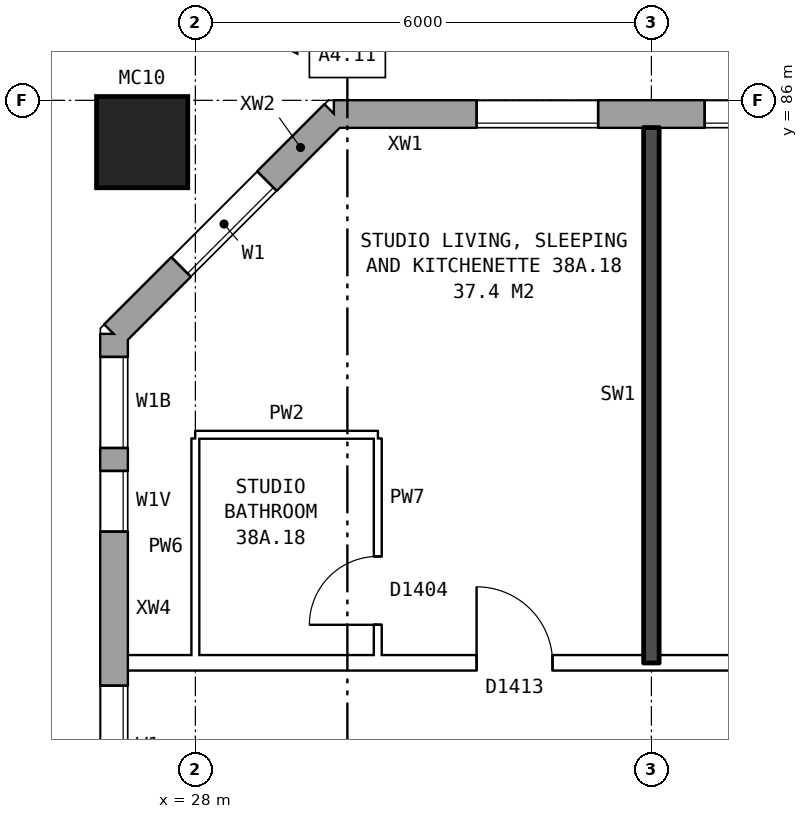
"""IFC4 building model, lengths in metres.
Left out: names, types, materials, properties, quantities, classifications, styles, units other than length and angle.
Written with IfcOpenShell. Run it as: python <this file> out.ifc"""

import sys

from ifc_helpers import new_model, si_unit, direction, frame, frame_2d, origin, origin_2d, place, context, subcontext, project, spatial, rectangle, hollow_rectangle, extrude, element, fill, save


model = new_model("IFC4")
c1 = context("Model", 3, precision=1e-05, world=origin(), true_north=direction((0.0, 1.0)))
c2 = subcontext(c1, "Body", "Model", "MODEL_VIEW")
j1 = project(units=[si_unit("LENGTHUNIT", "METRE"), si_unit("PLANEANGLEUNIT", "RADIAN")], contexts=[c1])
p1 = place(None, origin())
s1 = spatial("IfcSite", under=j1, at=p1, CompositionType="ELEMENT")
p2 = place(p1, origin())
s2 = spatial("IfcBuilding", under=s1, at=p2, CompositionType="ELEMENT")
p3 = place(p2, frame((0.0, 0.0, 136.1)))
s3 = spatial("IfcBuildingStorey", under=s2, at=p3, CompositionType="ELEMENT", Elevation=136.1)
p4 = place(p3, frame((27.3, 85.45, 0.0), z_axis=(0.0, 0.0, 1.0), x_axis=(1.0, 0.0, 0.0)))
e1 = element("IfcColumn", 1, at=p4, inside=s3, PredefinedType="COLUMN", context=c2, shape_type="SweptSolid", body=[
    extrude(hollow_rectangle(XDim=1.2, YDim=1.2, WallThickness=0.065, at=origin_2d()), origin(), (0.0, 0.0, 1.0), 3.1),
])
p5 = place(p3, frame((72.925, 85.82, 0.0), z_axis=(0.0, 0.0, 1.0), x_axis=(-1.0, 0.0, 0.0)))
e2 = element("IfcWall", 2, at=p5, inside=s3, PredefinedType="STANDARD", context=c2, shape_type="SweptSolid", body=[
    extrude(rectangle(XDim=43.101, YDim=0.36, at=frame_2d((21.55, 0.0))), origin(), (0.0, 0.0, 1.0), 2.85),
])
p6 = place(p5, frame((0.625, 0.0, 0.8)))
e3 = element("IfcOpeningElement", 3, at=p6, cuts=e2, PredefinedType="OPENING", context=c2, shape_type="SweptSolid", body=[
    extrude(rectangle(XDim=1.6, YDim=1.8, at=frame_2d((0.8, 0.9))), frame((0.0, 0.19, 0.0), z_axis=(0.0, -1.0, 0.0), x_axis=(1.0, 0.0, 0.0)), (0.0, 0.0, 1.0), 0.38),
])
p7 = place(p5, frame((3.625, 0.0, 0.8)))
e4 = element("IfcOpeningElement", 4, at=p7, cuts=e2, PredefinedType="OPENING", context=c2, shape_type="SweptSolid", body=[
    extrude(rectangle(XDim=1.6, YDim=1.8, at=frame_2d((0.8, 0.9))), frame((0.0, 0.19, 0.0), z_axis=(0.0, -1.0, 0.0), x_axis=(1.0, 0.0, 0.0)), (0.0, 0.0, 1.0), 0.38),
])
p8 = place(p5, frame((6.625, 0.0, 0.8)))
e5 = element("IfcOpeningElement", 5, at=p8, cuts=e2, PredefinedType="OPENING", context=c2, shape_type="SweptSolid", body=[
    extrude(rectangle(XDim=1.6, YDim=1.8, at=frame_2d((0.8, 0.9))), frame((0.0, 0.19, 0.0), z_axis=(0.0, -1.0, 0.0), x_axis=(1.0, 0.0, 0.0)), (0.0, 0.0, 1.0), 0.38),
])
p9 = place(p5, frame((9.625, 0.0, 0.8)))
e6 = element("IfcOpeningElement", 6, at=p9, cuts=e2, PredefinedType="OPENING", context=c2, shape_type="SweptSolid", body=[
    extrude(rectangle(XDim=1.6, YDim=1.8, at=frame_2d((0.8, 0.9))), frame((0.0, 0.19, 0.0), z_axis=(0.0, -1.0, 0.0), x_axis=(1.0, 0.0, 0.0)), (0.0, 0.0, 1.0), 0.38),
])
p10 = place(p5, frame((12.625, 0.0, 0.8)))
e7 = element("IfcOpeningElement", 7, at=p10, cuts=e2, PredefinedType="OPENING", context=c2, shape_type="SweptSolid", body=[
    extrude(rectangle(XDim=1.6, YDim=1.8, at=frame_2d((0.8, 0.9))), frame((0.0, 0.19, 0.0), z_axis=(0.0, -1.0, 0.0), x_axis=(1.0, 0.0, 0.0)), (0.0, 0.0, 1.0), 0.38),
])
p11 = place(p5, frame((15.125, 0.0, 1.35)))
e8 = element("IfcOpeningElement", 8, at=p11, cuts=e2, PredefinedType="OPENING", context=c2, shape_type="SweptSolid", body=[
    extrude(rectangle(XDim=1.0, YDim=1.2, at=frame_2d((0.5, 0.6))), frame((0.0, 0.19, 0.0), z_axis=(0.0, -1.0, 0.0), x_axis=(1.0, 0.0, 0.0)), (0.0, 0.0, 1.0), 0.38),
])
p12 = place(p5, frame((18.625, 0.0, 0.8)))
e9 = element("IfcOpeningElement", 9, at=p12, cuts=e2, PredefinedType="OPENING", context=c2, shape_type="SweptSolid", body=[
    extrude(rectangle(XDim=1.6, YDim=1.8, at=frame_2d((0.8, 0.9))), frame((0.0, 0.19, 0.0), z_axis=(0.0, -1.0, 0.0), x_axis=(1.0, 0.0, 0.0)), (0.0, 0.0, 1.0), 0.38),
])
p13 = place(p5, frame((21.625, 0.0, 0.8)))
e10 = element("IfcOpeningElement", 10, at=p13, cuts=e2, PredefinedType="OPENING", context=c2, shape_type="SweptSolid", body=[
    extrude(rectangle(XDim=1.6, YDim=1.8, at=frame_2d((0.8, 0.9))), frame((0.0, 0.19, 0.0), z_axis=(0.0, -1.0, 0.0), x_axis=(1.0, 0.0, 0.0)), (0.0, 0.0, 1.0), 0.38),
])
p14 = place(p5, frame((24.075, 0.0, 0.35)))
e11 = element("IfcOpeningElement", 11, at=p14, cuts=e2, PredefinedType="OPENING", context=c2, shape_type="SweptSolid", body=[
    extrude(rectangle(XDim=0.8, YDim=1.8, at=frame_2d((0.4, 0.9))), frame((0.0, 0.19, 0.0), z_axis=(0.0, -1.0, 0.0), x_axis=(1.0, 0.0, 0.0)), (0.0, 0.0, 1.0), 0.38),
])
p15 = place(p5, frame((27.625, 0.0, 0.8)))
e12 = element("IfcOpeningElement", 12, at=p15, cuts=e2, PredefinedType="OPENING", context=c2, shape_type="SweptSolid", body=[
    extrude(rectangle(XDim=1.6, YDim=1.8, at=frame_2d((0.8, 0.9))), frame((0.0, 0.19, 0.0), z_axis=(0.0, -1.0, 0.0), x_axis=(1.0, 0.0, 0.0)), (0.0, 0.0, 1.0), 0.38),
])
p16 = place(p5, frame((30.625, 0.0, 0.8)))
e13 = element("IfcOpeningElement", 13, at=p16, cuts=e2, PredefinedType="OPENING", context=c2, shape_type="SweptSolid", body=[
    extrude(rectangle(XDim=1.6, YDim=1.8, at=frame_2d((0.8, 0.9))), frame((0.0, 0.19, 0.0), z_axis=(0.0, -1.0, 0.0), x_axis=(1.0, 0.0, 0.0)), (0.0, 0.0, 1.0), 0.38),
])
p17 = place(p5, frame((33.625, 0.0, 0.8)))
e14 = element("IfcOpeningElement", 14, at=p17, cuts=e2, PredefinedType="OPENING", context=c2, shape_type="SweptSolid", body=[
    extrude(rectangle(XDim=1.6, YDim=1.8, at=frame_2d((0.8, 0.9))), frame((0.0, 0.19, 0.0), z_axis=(0.0, -1.0, 0.0), x_axis=(1.0, 0.0, 0.0)), (0.0, 0.0, 1.0), 0.38),
])
p18 = place(p5, frame((36.625, 0.0, 0.8)))
e15 = element("IfcOpeningElement", 15, at=p18, cuts=e2, PredefinedType="OPENING", context=c2, shape_type="SweptSolid", body=[
    extrude(rectangle(XDim=1.6, YDim=1.8, at=frame_2d((0.8, 0.9))), frame((0.0, 0.19, 0.0), z_axis=(0.0, -1.0, 0.0), x_axis=(1.0, 0.0, 0.0)), (0.0, 0.0, 1.0), 0.38),
])
p19 = place(p5, frame((39.625, 0.0, 0.8)))
e16 = element("IfcOpeningElement", 16, at=p19, cuts=e2, PredefinedType="OPENING", context=c2, shape_type="SweptSolid", body=[
    extrude(rectangle(XDim=1.6, YDim=1.8, at=frame_2d((0.8, 0.9))), frame((0.0, 0.19, 0.0), z_axis=(0.0, -1.0, 0.0), x_axis=(1.0, 0.0, 0.0)), (0.0, 0.0, 1.0), 0.38),
])
p20 = place(p5, frame((16.975, 0.0, 0.15)))
e17 = element("IfcOpeningElement", 17, at=p20, cuts=e2, PredefinedType="OPENING", context=c2, shape_type="SweptSolid", body=[
    extrude(rectangle(XDim=0.8, YDim=0.9, at=frame_2d((0.4, 0.45))), frame((0.0, 0.19, 0.0), z_axis=(0.0, -1.0, 0.0), x_axis=(1.0, 0.0, 0.0)), (0.0, 0.0, 1.0), 0.38),
])
p21 = place(p5, frame((25.175, 0.0, 0.25)))
e18 = element("IfcOpeningElement", 18, at=p21, cuts=e2, PredefinedType="OPENING", context=c2, shape_type="SweptSolid", body=[
    extrude(rectangle(XDim=0.8, YDim=0.9, at=frame_2d((0.4, 0.45))), frame((0.0, 0.19, 0.0), z_axis=(0.0, -1.0, 0.0), x_axis=(1.0, 0.0, 0.0)), (0.0, 0.0, 1.0), 0.38),
])
p22 = place(p3, frame((29.825, 85.82, 0.0), z_axis=(0.0, 0.0, 1.0), x_axis=(-0.707106781187, -0.707106781187, 0.0)))
e19 = element("IfcWall", 19, at=p22, inside=s3, PredefinedType="STANDARD", context=c2, shape_type="SweptSolid", body=[
    extrude(rectangle(XDim=4.094, YDim=0.36, at=frame_2d((2.047, 0.0))), origin(), (0.0, 0.0, 1.0), 2.85),
])
p23 = place(p22, frame((1.247, 0.0, 0.8)))
e20 = element("IfcOpeningElement", 20, at=p23, cuts=e19, PredefinedType="OPENING", context=c2, shape_type="SweptSolid", body=[
    extrude(rectangle(XDim=1.6, YDim=1.8, at=frame_2d((0.8, 0.9))), frame((0.0, 0.19, 0.0), z_axis=(0.0, -1.0, 0.0), x_axis=(1.0, 0.0, 0.0)), (0.0, 0.0, 1.0), 0.38),
])
p24 = place(p3, frame((26.93, 82.925, 0.0), z_axis=(0.0, 0.0, 1.0), x_axis=(0.0, -1.0, 0.0)))
e21 = element("IfcWall", 21, at=p24, inside=s3, PredefinedType="STANDARD", context=c2, shape_type="SweptSolid", body=[
    extrude(rectangle(XDim=25.851, YDim=0.36, at=frame_2d((12.925, 0.0))), origin(), (0.0, 0.0, 1.0), 2.85),
])
p25 = place(p24, frame((0.3, 0.0, 0.8)))
e22 = element("IfcOpeningElement", 22, at=p25, cuts=e21, PredefinedType="OPENING", context=c2, shape_type="SweptSolid", body=[
    extrude(rectangle(XDim=1.2, YDim=1.8, at=frame_2d((0.6, 0.9))), frame((0.0, 0.19, 0.0), z_axis=(0.0, -1.0, 0.0), x_axis=(1.0, 0.0, 0.0)), (0.0, 0.0, 1.0), 0.38),
])
p26 = place(p24, frame((4.625, 0.0, 0.8)))
e23 = element("IfcOpeningElement", 23, at=p26, cuts=e21, PredefinedType="OPENING", context=c2, shape_type="SweptSolid", body=[
    extrude(rectangle(XDim=1.6, YDim=1.8, at=frame_2d((0.8, 0.9))), frame((0.0, 0.19, 0.0), z_axis=(0.0, -1.0, 0.0), x_axis=(1.0, 0.0, 0.0)), (0.0, 0.0, 1.0), 0.38),
])
p27 = place(p24, frame((7.625, 0.0, 0.8)))
e24 = element("IfcOpeningElement", 24, at=p27, cuts=e21, PredefinedType="OPENING", context=c2, shape_type="SweptSolid", body=[
    extrude(rectangle(XDim=1.6, YDim=1.8, at=frame_2d((0.8, 0.9))), frame((0.0, 0.19, 0.0), z_axis=(0.0, -1.0, 0.0), x_axis=(1.0, 0.0, 0.0)), (0.0, 0.0, 1.0), 0.38),
])
p28 = place(p24, frame((10.625, 0.0, 0.8)))
e25 = element("IfcOpeningElement", 25, at=p28, cuts=e21, PredefinedType="OPENING", context=c2, shape_type="SweptSolid", body=[
    extrude(rectangle(XDim=1.6, YDim=1.8, at=frame_2d((0.8, 0.9))), frame((0.0, 0.19, 0.0), z_axis=(0.0, -1.0, 0.0), x_axis=(1.0, 0.0, 0.0)), (0.0, 0.0, 1.0), 0.38),
])
p29 = place(p24, frame((13.625, 0.0, 0.8)))
e26 = element("IfcOpeningElement", 26, at=p29, cuts=e21, PredefinedType="OPENING", context=c2, shape_type="SweptSolid", body=[
    extrude(rectangle(XDim=1.6, YDim=1.8, at=frame_2d((0.8, 0.9))), frame((0.0, 0.19, 0.0), z_axis=(0.0, -1.0, 0.0), x_axis=(1.0, 0.0, 0.0)), (0.0, 0.0, 1.0), 0.38),
])
p30 = place(p24, frame((16.625, 0.0, 0.8)))
e27 = element("IfcOpeningElement", 27, at=p30, cuts=e21, PredefinedType="OPENING", context=c2, shape_type="SweptSolid", body=[
    extrude(rectangle(XDim=1.6, YDim=1.8, at=frame_2d((0.8, 0.9))), frame((0.0, 0.19, 0.0), z_axis=(0.0, -1.0, 0.0), x_axis=(1.0, 0.0, 0.0)), (0.0, 0.0, 1.0), 0.38),
])
p31 = place(p24, frame((19.625, 0.0, 0.8)))
e28 = element("IfcOpeningElement", 28, at=p31, cuts=e21, PredefinedType="OPENING", context=c2, shape_type="SweptSolid", body=[
    extrude(rectangle(XDim=1.6, YDim=1.8, at=frame_2d((0.8, 0.9))), frame((0.0, 0.19, 0.0), z_axis=(0.0, -1.0, 0.0), x_axis=(1.0, 0.0, 0.0)), (0.0, 0.0, 1.0), 0.38),
])
p32 = place(p24, frame((23.125, 0.0, 0.8)))
e29 = element("IfcOpeningElement", 29, at=p32, cuts=e21, PredefinedType="OPENING", context=c2, shape_type="SweptSolid", body=[
    extrude(rectangle(XDim=1.0, YDim=0.9, at=frame_2d((0.5, 0.45))), frame((0.0, 0.19, 0.0), z_axis=(0.0, -1.0, 0.0), x_axis=(1.0, 0.0, 0.0)), (0.0, 0.0, 1.0), 0.38),
])
p33 = place(p24, frame((1.8, 0.0, 0.8)))
e30 = element("IfcOpeningElement", 30, at=p33, cuts=e21, PredefinedType="OPENING", context=c2, shape_type="SweptSolid", body=[
    extrude(rectangle(XDim=0.8, YDim=0.9, at=frame_2d((0.4, 0.45))), frame((0.0, 0.19, 0.0), z_axis=(0.0, -1.0, 0.0), x_axis=(1.0, 0.0, 0.0)), (0.0, 0.0, 1.0), 0.38),
])
p34 = place(p24, frame((24.425, 0.0, 0.8)))
e31 = element("IfcOpeningElement", 31, at=p34, cuts=e21, PredefinedType="OPENING", context=c2, shape_type="SweptSolid", body=[
    extrude(rectangle(XDim=1.0, YDim=1.8, at=frame_2d((0.5, 0.9))), frame((0.0, 0.19, 0.0), z_axis=(0.0, -1.0, 0.0), x_axis=(1.0, 0.0, 0.0)), (0.0, 0.0, 1.0), 0.38),
])
p35 = place(p3, frame((27.11, 78.6, 0.0), z_axis=(0.0, 0.0, 1.0), x_axis=(1.0, 0.0, 0.0)))
e32 = element("IfcWall", 32, at=p35, inside=s3, PredefinedType="PARTITIONING", context=c2, shape_type="SweptSolid", body=[
    extrude(rectangle(XDim=18.79, YDim=0.2, at=frame_2d((9.395, 0.0))), origin(), (0.0, 0.0, 1.0), 2.85),
])
p36 = place(p35, frame((14.19, 0.0, 0.0)))
e33 = element("IfcOpeningElement", 33, at=p36, cuts=e32, PredefinedType="OPENING", context=c2, shape_type="SweptSolid", body=[
    extrude(rectangle(XDim=1.0, YDim=2.1, at=frame_2d((0.5, 1.05))), frame((0.0, 0.11, 0.0), z_axis=(0.0, -1.0, 0.0), x_axis=(1.0, 0.0, 0.0)), (0.0, 0.0, 1.0), 0.22),
])
p37 = place(p35, frame((8.19, 0.0, 0.0)))
e34 = element("IfcOpeningElement", 34, at=p37, cuts=e32, PredefinedType="OPENING", context=c2, shape_type="SweptSolid", body=[
    extrude(rectangle(XDim=1.0, YDim=2.1, at=frame_2d((0.5, 1.05))), frame((0.0, 0.11, 0.0), z_axis=(0.0, -1.0, 0.0), x_axis=(1.0, 0.0, 0.0)), (0.0, 0.0, 1.0), 0.22),
])
p38 = place(p35, frame((4.59, 0.0, 0.0)))
e35 = element("IfcOpeningElement", 35, at=p38, cuts=e32, PredefinedType="OPENING", context=c2, shape_type="SweptSolid", body=[
    extrude(rectangle(XDim=1.0, YDim=2.1, at=frame_2d((0.5, 1.05))), frame((0.0, 0.11, 0.0), z_axis=(0.0, -1.0, 0.0), x_axis=(1.0, 0.0, 0.0)), (0.0, 0.0, 1.0), 0.22),
])
p39 = place(p3, frame((28.0, 81.6, 0.0), z_axis=(0.0, 0.0, 1.0), x_axis=(1.0, 0.0, 0.0)))
e36 = element("IfcWall", 36, at=p39, inside=s3, PredefinedType="PARTITIONING", context=c2, shape_type="SweptSolid", body=[
    extrude(rectangle(XDim=2.4, YDim=0.1, at=frame_2d((1.2, 0.0))), origin(), (0.0, 0.0, 1.0), 2.85),
])
p40 = place(p3, frame((28.0, 78.7, 0.0), z_axis=(0.0, 0.0, 1.0), x_axis=(0.0, 1.0, 0.0)))
e37 = element("IfcWall", 37, at=p40, inside=s3, PredefinedType="PARTITIONING", context=c2, shape_type="SweptSolid", body=[
    extrude(rectangle(XDim=2.85, YDim=0.1, at=frame_2d((1.425, 0.0))), origin(), (0.0, 0.0, 1.0), 2.85),
])
p41 = place(p3, frame((30.4, 78.7, 0.0), z_axis=(0.0, 0.0, 1.0), x_axis=(0.0, 1.0, 0.0)))
e38 = element("IfcWall", 38, at=p41, inside=s3, PredefinedType="PARTITIONING", context=c2, shape_type="SweptSolid", body=[
    extrude(rectangle(XDim=2.85, YDim=0.1, at=frame_2d((1.425, 0.0))), origin(), (0.0, 0.0, 1.0), 2.85),
])
p42 = place(p41, frame((0.4, 0.0, 0.0)))
e39 = element("IfcOpeningElement", 39, at=p42, cuts=e38, PredefinedType="OPENING", context=c2, shape_type="SweptSolid", body=[
    extrude(rectangle(XDim=0.9, YDim=2.1, at=frame_2d((0.45, 1.05))), frame((0.0, 0.06, 0.0), z_axis=(0.0, -1.0, 0.0), x_axis=(1.0, 0.0, 0.0)), (0.0, 0.0, 1.0), 0.12),
])
p43 = place(p3, frame((34.0, 78.6, 0.0), z_axis=(0.0, 0.0, 1.0), x_axis=(0.0, 1.0, 0.0)))
e40 = element("IfcWall", 40, at=p43, inside=s3, PredefinedType="SOLIDWALL", context=c2, shape_type="SweptSolid", body=[
    extrude(rectangle(XDim=7.04, YDim=0.2, at=frame_2d((3.52, 0.0))), origin(), (0.0, 0.0, 1.0), 2.85),
])
p44 = place(p18, origin())
e41 = element("IfcWindow", 41, at=p44, inside=s3, PartitioningType="SINGLE_PANEL", PredefinedType="WINDOW", context=c2, shape_type="SweptSolid", body=[
    extrude(rectangle(XDim=1.6, YDim=1.8, at=frame_2d((0.8, 0.9))), frame((0.0, 0.15, 0.0), z_axis=(0.0, -1.0, 0.0), x_axis=(1.0, 0.0, 0.0)), (0.0, 0.0, 1.0), 0.06),
])
fill(e15, e41)
p45 = place(p19, origin())
e42 = element("IfcWindow", 42, at=p45, inside=s3, PartitioningType="SINGLE_PANEL", PredefinedType="WINDOW", context=c2, shape_type="SweptSolid", body=[
    extrude(rectangle(XDim=1.6, YDim=1.8, at=frame_2d((0.8, 0.9))), frame((0.0, 0.15, 0.0), z_axis=(0.0, -1.0, 0.0), x_axis=(1.0, 0.0, 0.0)), (0.0, 0.0, 1.0), 0.06),
])
fill(e16, e42)
p46 = place(p23, origin())
e43 = element("IfcWindow", 43, at=p46, inside=s3, PartitioningType="SINGLE_PANEL", PredefinedType="WINDOW", context=c2, shape_type="SweptSolid", body=[
    extrude(rectangle(XDim=1.6, YDim=1.8, at=frame_2d((0.8, 0.9))), frame((0.0, 0.15, 0.0), z_axis=(0.0, -1.0, 0.0), x_axis=(1.0, 0.0, 0.0)), (0.0, 0.0, 1.0), 0.06),
])
fill(e20, e43)
p47 = place(p25, origin())
e44 = element("IfcWindow", 44, at=p47, inside=s3, PartitioningType="SINGLE_PANEL", PredefinedType="WINDOW", context=c2, shape_type="SweptSolid", body=[
    extrude(rectangle(XDim=1.2, YDim=1.8, at=frame_2d((0.6, 0.9))), frame((0.0, 0.15, 0.0), z_axis=(0.0, -1.0, 0.0), x_axis=(1.0, 0.0, 0.0)), (0.0, 0.0, 1.0), 0.06),
])
fill(e22, e44)
p48 = place(p26, origin())
e45 = element("IfcWindow", 45, at=p48, inside=s3, PartitioningType="SINGLE_PANEL", PredefinedType="WINDOW", context=c2, shape_type="SweptSolid", body=[
    extrude(rectangle(XDim=1.6, YDim=1.8, at=frame_2d((0.8, 0.9))), frame((0.0, 0.15, 0.0), z_axis=(0.0, -1.0, 0.0), x_axis=(1.0, 0.0, 0.0)), (0.0, 0.0, 1.0), 0.06),
])
fill(e23, e45)
p49 = place(p38, origin())
e46 = element("IfcDoor", 46, at=p49, inside=s3, OperationType="SINGLE_SWING_LEFT", PredefinedType="DOOR", context=c2, shape_type="SweptSolid", body=[
    extrude(rectangle(XDim=1.0, YDim=2.1, at=frame_2d((0.5, 1.05))), frame((0.0, 0.025, 0.0), z_axis=(0.0, -1.0, 0.0), x_axis=(1.0, 0.0, 0.0)), (0.0, 0.0, 1.0), 0.05),
])
fill(e35, e46)
p50 = place(p42, origin())
e47 = element("IfcDoor", 47, at=p50, inside=s3, OperationType="SINGLE_SWING_LEFT", PredefinedType="DOOR", context=c2, shape_type="SweptSolid", body=[
    extrude(rectangle(XDim=0.9, YDim=2.1, at=frame_2d((0.45, 1.05))), frame((0.0, 0.025, 0.0), z_axis=(0.0, -1.0, 0.0), x_axis=(1.0, 0.0, 0.0)), (0.0, 0.0, 1.0), 0.05),
])
fill(e39, e47)
p51 = place(p33, origin())
e48 = element("IfcWindow", 48, at=p51, inside=s3, PartitioningType="SINGLE_PANEL", PredefinedType="WINDOW", context=c2, shape_type="SweptSolid", body=[
    extrude(rectangle(XDim=0.8, YDim=0.9, at=frame_2d((0.4, 0.45))), frame((0.0, 0.15, 0.0), z_axis=(0.0, -1.0, 0.0), x_axis=(1.0, 0.0, 0.0)), (0.0, 0.0, 1.0), 0.06),
])
fill(e30, e48)
save(model, sys.argv[1])
